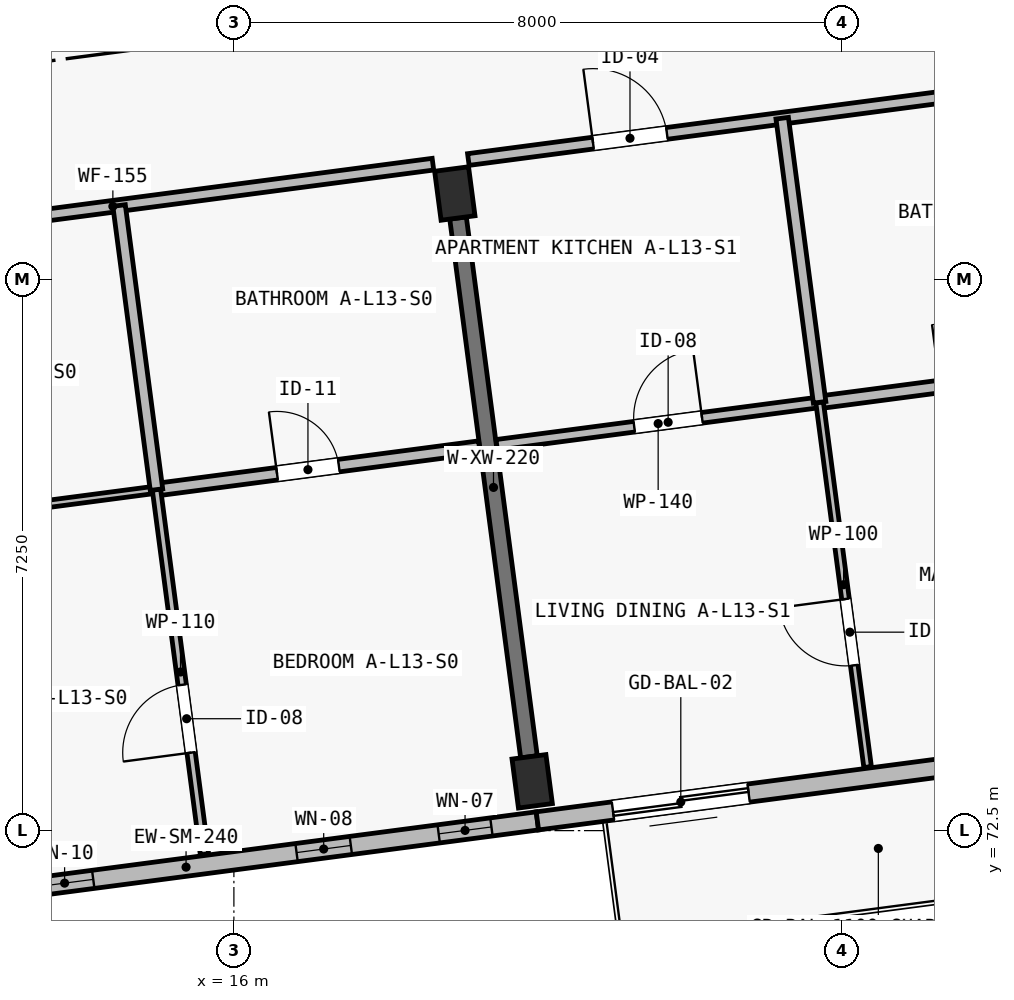
"""IFC4 building model, lengths in metres.
Left out: names, types, materials, properties, quantities, classifications, styles, units other than length and angle.
Written with IfcOpenShell. Run it as: python <this file> out.ifc"""

import sys

from ifc_helpers import new_model, si_unit, direction, frame, frame_2d, origin, origin_2d, place, context, subcontext, project, spatial, polyline, rectangle, outline, extrude, element, fill, save


model = new_model("IFC4")
c1 = context("Model", 3, precision=1e-05, world=origin(), true_north=direction((0.0, 1.0)))
c2 = subcontext(c1, "Body", "Model", "MODEL_VIEW")
j1 = project(units=[si_unit("LENGTHUNIT", "METRE"), si_unit("PLANEANGLEUNIT", "RADIAN")], contexts=[c1])
p1 = place(None, origin())
s1 = spatial("IfcSite", under=j1, at=p1, CompositionType="ELEMENT")
p2 = place(p1, origin())
s2 = spatial("IfcBuilding", under=s1, at=p2, CompositionType="ELEMENT")
p3 = place(p2, frame((0.0, 0.0, 44.15)))
s3 = spatial("IfcBuildingStorey", under=s2, at=p3, CompositionType="ELEMENT", Elevation=44.15)
for number, where, z_axis, x_axis in (
    (1, (19.925, 73.149, 0.0), (0.0, 0.0, 1.0), (0.991, 0.131, 0.0)),
    (2, (18.906, 80.882, 0.0), (0.0, 0.0, 1.0), (0.991, 0.131, 0.0)),
):
    element("IfcColumn", number, at=place(p3, frame(where, z_axis=z_axis, x_axis=x_axis)), inside=s3, PredefinedType="COLUMN", context=c2, shape_type="SweptSolid", body=[
        extrude(rectangle(XDim=0.45, YDim=0.65, at=origin_2d()), origin(), (0.0, 0.0, 1.0), 3.5),
    ])
p4 = place(p3, frame((19.882, 73.471, 0.0), z_axis=(0.0, 0.0, 1.0), x_axis=(-0.130541958643, 0.991442785557, 0.0)))
e3 = element("IfcWall", 3, at=p4, inside=s3, PredefinedType="SHEAR", context=c2, shape_type="SweptSolid", body=[
    extrude(rectangle(XDim=7.15, YDim=0.22, at=frame_2d((3.575, 0.0))), origin(), (0.0, 0.0, 1.0), 2.75),
])
p5 = place(p3, frame((19.993, 72.628, 0.0), z_axis=(0.0, 0.0, 1.0), x_axis=(-0.991442885224, -0.130541201693, 0.0)))
e4 = element("IfcWall", 4, at=p5, inside=s3, PredefinedType="SOLIDWALL", context=c2, shape_type="SweptSolid", body=[
    extrude(outline(polyline([(0.0, 0.0), (9.325, 0.0), (9.325, 7.697), (0.0, 6.119), (0.0, 0.0)])), frame((0.0, 0.12, 0.0), z_axis=(0.0, -1.0, 0.0), x_axis=(1.0, 0.0, 0.0)), (0.0, 0.0, 1.0), 0.24),
])
p6 = place(p5, frame((0.61, 0.0, 0.48)))
e5 = element("IfcOpeningElement", 5, at=p6, cuts=e4, PredefinedType="OPENING", context=c2, shape_type="SweptSolid", body=[
    extrude(rectangle(XDim=0.7, YDim=2.36, at=frame_2d((0.35, 1.18))), frame((0.0, 0.135, 0.0), z_axis=(0.0, -1.0, 0.0), x_axis=(1.0, 0.0, 0.0)), (0.0, 0.0, 1.0), 0.27),
])
p7 = place(p5, frame((2.476, 0.0, 0.52)))
e6 = element("IfcOpeningElement", 6, at=p7, cuts=e4, PredefinedType="OPENING", context=c2, shape_type="SweptSolid", body=[
    extrude(rectangle(XDim=0.72, YDim=2.16, at=frame_2d((0.36, 1.08))), frame((0.0, 0.135, 0.0), z_axis=(0.0, -1.0, 0.0), x_axis=(1.0, 0.0, 0.0)), (0.0, 0.0, 1.0), 0.27),
])
p8 = place(p5, frame((5.894, 0.0, 0.48)))
e7 = element("IfcOpeningElement", 7, at=p8, cuts=e4, PredefinedType="OPENING", context=c2, shape_type="SweptSolid", body=[
    extrude(rectangle(XDim=0.76, YDim=2.34, at=frame_2d((0.38, 1.17))), frame((0.0, 0.135, 0.0), z_axis=(0.0, -1.0, 0.0), x_axis=(1.0, 0.0, 0.0)), (0.0, 0.0, 1.0), 0.27),
])
p9 = place(p3, frame((28.718, 73.777, 0.0), z_axis=(0.0, 0.0, 1.0), x_axis=(-0.991444377792, -0.130529865336, 0.0)))
e8 = element("IfcWall", 8, at=p9, inside=s3, PredefinedType="SOLIDWALL", context=c2, shape_type="SweptSolid", body=[
    extrude(outline(polyline([(0.0, 0.0), (8.8, 0.0), (8.8, 6.119), (0.0, 4.629), (0.0, 0.0)])), frame((0.0, 0.12, 0.0), z_axis=(0.0, -1.0, 0.0), x_axis=(1.0, 0.0, 0.0)), (0.0, 0.0, 1.0), 0.24),
])
p10 = place(p9, frame((5.997, 0.0, 0.0)))
e9 = element("IfcOpeningElement", 9, at=p10, cuts=e8, PredefinedType="OPENING", context=c2, shape_type="SweptSolid", body=[
    extrude(rectangle(XDim=1.8, YDim=2.12, at=frame_2d((0.9, 1.06))), frame((0.0, 0.135, 0.0), z_axis=(0.0, -1.0, 0.0), x_axis=(1.0, 0.0, 0.0)), (0.0, 0.0, 1.0), 0.27),
])
p11 = place(p9, frame((0.83, 0.0, 0.5)))
e10 = element("IfcOpeningElement", 10, at=p11, cuts=e8, PredefinedType="OPENING", context=c2, shape_type="SweptSolid", body=[
    extrude(rectangle(XDim=0.84, YDim=2.28, at=frame_2d((0.42, 1.14))), frame((0.0, 0.135, 0.0), z_axis=(0.0, -1.0, 0.0), x_axis=(1.0, 0.0, 0.0)), (0.0, 0.0, 1.0), 0.27),
])
p12 = place(p3, frame((10.197, 80.159, 0.0), z_axis=(0.0, 0.0, 1.0), x_axis=(0.991447642549, 0.130505065361, 0.0)))
e11 = element("IfcWall", 11, at=p12, inside=s3, PredefinedType="PARTITIONING", context=c2, shape_type="SweptSolid", body=[
    extrude(rectangle(XDim=8.495, YDim=0.155, at=frame_2d((4.248, 0.0))), origin(), (0.0, 0.0, 1.0), 3.15),
])
p13 = place(p12, frame((1.82, 0.0, 0.0)))
e12 = element("IfcOpeningElement", 12, at=p13, cuts=e11, PredefinedType="OPENING", context=c2, shape_type="SweptSolid", body=[
    extrude(rectangle(XDim=1.02, YDim=2.2, at=frame_2d((0.51, 1.1))), frame((0.0, 0.093, 0.0), z_axis=(0.0, -1.0, 0.0), x_axis=(1.0, 0.0, 0.0)), (0.0, 0.0, 1.0), 0.185),
])
p14 = place(p3, frame((10.708, 76.424, 0.0), z_axis=(0.0, 0.0, 1.0), x_axis=(0.991438863922, 0.130571739306, 0.0)))
e13 = element("IfcWall", 13, at=p14, inside=s3, PredefinedType="PARTITIONING", context=c2, shape_type="SweptSolid", body=[
    extrude(rectangle(XDim=4.31, YDim=0.095, at=frame_2d((2.155, 0.0))), origin(), (0.0, 0.0, 1.0), 3.15),
])
p15 = place(p14, frame((1.85, 0.0, 0.0)))
e14 = element("IfcOpeningElement", 14, at=p15, cuts=e13, PredefinedType="OPENING", context=c2, shape_type="SweptSolid", body=[
    extrude(rectangle(XDim=0.9, YDim=2.1, at=frame_2d((0.45, 1.05))), frame((0.0, 0.062, 0.0), z_axis=(0.0, -1.0, 0.0), x_axis=(1.0, 0.0, 0.0)), (0.0, 0.0, 1.0), 0.125),
])
p16 = place(p3, frame((14.981, 76.986, 0.0), z_axis=(0.0, 0.0, 1.0), x_axis=(0.991444014242, 0.130532626667, 0.0)))
e15 = element("IfcWall", 15, at=p16, inside=s3, PredefinedType="PLUMBINGWALL", context=c2, shape_type="SweptSolid", body=[
    extrude(rectangle(XDim=4.285, YDim=0.165, at=frame_2d((2.143, 0.0))), origin(), (0.0, 0.0, 1.0), 3.15),
])
p17 = place(p16, frame((1.6, 0.0, 0.0)))
e16 = element("IfcOpeningElement", 16, at=p17, cuts=e15, PredefinedType="OPENING", context=c2, shape_type="SweptSolid", body=[
    extrude(rectangle(XDim=0.82, YDim=2.08, at=frame_2d((0.41, 1.04))), frame((0.0, 0.097, 0.0), z_axis=(0.0, -1.0, 0.0), x_axis=(1.0, 0.0, 0.0)), (0.0, 0.0, 1.0), 0.195),
])
p18 = place(p3, frame((15.613, 72.188, 0.0), z_axis=(0.0, 0.0, 1.0), x_axis=(-0.130544545786, 0.991442444908, 0.0)))
e17 = element("IfcWall", 17, at=p18, inside=s3, PredefinedType="PARTITIONING", context=c2, shape_type="SweptSolid", body=[
    extrude(rectangle(XDim=4.84, YDim=0.11, at=frame_2d((2.42, 0.0))), origin(), (0.0, 0.0, 1.0), 3.15),
])
p19 = place(p18, frame((1.35, 0.0, 0.0)))
e18 = element("IfcOpeningElement", 18, at=p19, cuts=e17, PredefinedType="OPENING", context=c2, shape_type="SweptSolid", body=[
    extrude(rectangle(XDim=0.9, YDim=2.1, at=frame_2d((0.45, 1.05))), frame((0.0, 0.07, 0.0), z_axis=(0.0, -1.0, 0.0), x_axis=(1.0, 0.0, 0.0)), (0.0, 0.0, 1.0), 0.14),
])
p20 = place(p3, frame((14.981, 76.986, 0.0), z_axis=(0.0, 0.0, 1.0), x_axis=(-0.130496394248, 0.991448783896, 0.0)))
e19 = element("IfcWall", 19, at=p20, inside=s3, PredefinedType="PLUMBINGWALL", context=c2, shape_type="SweptSolid", body=[
    extrude(rectangle(XDim=3.77, YDim=0.165, at=frame_2d((1.885, 0.0))), origin(), (0.0, 0.0, 1.0), 3.15),
])
p21 = place(p3, frame((19.085, 81.329, 0.0), z_axis=(0.0, 0.0, 1.0), x_axis=(0.991446911972, 0.130510615437, 0.0)))
e20 = element("IfcWall", 20, at=p21, inside=s3, PredefinedType="PARTITIONING", context=c2, shape_type="SweptSolid", body=[
    extrude(rectangle(XDim=8.33, YDim=0.155, at=frame_2d((4.165, 0.0))), origin(), (0.0, 0.0, 1.0), 3.15),
])
p22 = place(p21, frame((1.655, 0.0, 0.0)))
e21 = element("IfcOpeningElement", 21, at=p22, cuts=e20, PredefinedType="OPENING", context=c2, shape_type="SweptSolid", body=[
    extrude(rectangle(XDim=0.98, YDim=2.15, at=frame_2d((0.49, 1.075))), frame((0.0, 0.093, 0.0), z_axis=(0.0, -1.0, 0.0), x_axis=(1.0, 0.0, 0.0)), (0.0, 0.0, 1.0), 0.185),
])
p23 = place(p3, frame((19.458, 77.576, 0.0), z_axis=(0.0, 0.0, 1.0), x_axis=(0.991451386343, 0.130476620581, 0.0)))
e22 = element("IfcWall", 22, at=p23, inside=s3, PredefinedType="PARTITIONING", context=c2, shape_type="SweptSolid", body=[
    extrude(rectangle(XDim=4.285, YDim=0.14, at=frame_2d((2.143, 0.0))), origin(), (0.0, 0.0, 1.0), 3.15),
])
p24 = place(p23, frame((1.825, 0.0, 0.0)))
e23 = element("IfcOpeningElement", 23, at=p24, cuts=e22, PredefinedType="OPENING", context=c2, shape_type="SweptSolid", body=[
    extrude(rectangle(XDim=0.9, YDim=2.1, at=frame_2d((0.45, 1.05))), frame((0.0, 0.085, 0.0), z_axis=(0.0, -1.0, 0.0), x_axis=(1.0, 0.0, 0.0)), (0.0, 0.0, 1.0), 0.17),
])
p25 = place(p3, frame((23.706, 78.135, 0.0), z_axis=(0.0, 0.0, 1.0), x_axis=(0.991444014242, 0.130532626667, 0.0)))
e24 = element("IfcWall", 24, at=p25, inside=s3, PredefinedType="PLUMBINGWALL", context=c2, shape_type="SweptSolid", body=[
    extrude(rectangle(XDim=4.285, YDim=0.165, at=frame_2d((2.143, 0.0))), origin(), (0.0, 0.0, 1.0), 3.15),
])
p26 = place(p25, frame((1.6, 0.0, 0.0)))
e25 = element("IfcOpeningElement", 25, at=p26, cuts=e24, PredefinedType="OPENING", context=c2, shape_type="SweptSolid", body=[
    extrude(rectangle(XDim=0.82, YDim=2.08, at=frame_2d((0.41, 1.04))), frame((0.0, 0.097, 0.0), z_axis=(0.0, -1.0, 0.0), x_axis=(1.0, 0.0, 0.0)), (0.0, 0.0, 1.0), 0.195),
])
p27 = place(p3, frame((24.338, 73.336, 0.0), z_axis=(0.0, 0.0, 1.0), x_axis=(-0.130494962676, 0.991448972321, 0.0)))
e26 = element("IfcWall", 26, at=p27, inside=s3, PredefinedType="PARTITIONING", context=c2, shape_type="SweptSolid", body=[
    extrude(rectangle(XDim=4.84, YDim=0.1, at=frame_2d((2.42, 0.0))), origin(), (0.0, 0.0, 1.0), 3.15),
])
p28 = place(p27, frame((1.35, 0.0, 0.0)))
e27 = element("IfcOpeningElement", 27, at=p28, cuts=e26, PredefinedType="OPENING", context=c2, shape_type="SweptSolid", body=[
    extrude(rectangle(XDim=0.88, YDim=2.1, at=frame_2d((0.44, 1.05))), frame((0.0, 0.065, 0.0), z_axis=(0.0, -1.0, 0.0), x_axis=(1.0, 0.0, 0.0)), (0.0, 0.0, 1.0), 0.13),
])
p29 = place(p3, frame((23.706, 78.135, 0.0), z_axis=(0.0, 0.0, 1.0), x_axis=(-0.130551670646, 0.991441506742, 0.0)))
e28 = element("IfcWall", 28, at=p29, inside=s3, PredefinedType="PLUMBINGWALL", context=c2, shape_type="SweptSolid", body=[
    extrude(rectangle(XDim=3.77, YDim=0.165, at=frame_2d((1.885, 0.0))), origin(), (0.0, 0.0, 1.0), 3.15),
])
p30 = place(p6, origin())
e29 = element("IfcWindow", 29, at=p30, inside=s3, PartitioningType="SINGLE_PANEL", PredefinedType="WINDOW", context=c2, shape_type="SweptSolid", body=[
    extrude(rectangle(XDim=0.7, YDim=2.36, at=frame_2d((0.35, 1.18))), frame((0.0, 0.03, 0.0), z_axis=(0.0, -1.0, 0.0), x_axis=(1.0, 0.0, 0.0)), (0.0, 0.0, 1.0), 0.06),
])
fill(e5, e29)
p31 = place(p7, origin())
e30 = element("IfcWindow", 30, at=p31, inside=s3, PartitioningType="SINGLE_PANEL", PredefinedType="WINDOW", context=c2, shape_type="SweptSolid", body=[
    extrude(rectangle(XDim=0.72, YDim=2.16, at=frame_2d((0.36, 1.08))), frame((0.0, 0.03, 0.0), z_axis=(0.0, -1.0, 0.0), x_axis=(1.0, 0.0, 0.0)), (0.0, 0.0, 1.0), 0.06),
])
fill(e6, e30)
p32 = place(p8, origin())
e31 = element("IfcWindow", 31, at=p32, inside=s3, PartitioningType="SINGLE_PANEL", PredefinedType="WINDOW", context=c2, shape_type="SweptSolid", body=[
    extrude(rectangle(XDim=0.76, YDim=2.34, at=frame_2d((0.38, 1.17))), frame((0.0, 0.03, 0.0), z_axis=(0.0, -1.0, 0.0), x_axis=(1.0, 0.0, 0.0)), (0.0, 0.0, 1.0), 0.06),
])
fill(e7, e31)
p33 = place(p10, origin())
e32 = element("IfcDoor", 32, at=p33, inside=s3, OperationType="SLIDING_TO_LEFT", PredefinedType="DOOR", context=c2, shape_type="SweptSolid", body=[
    extrude(rectangle(XDim=1.8, YDim=2.12, at=frame_2d((0.9, 1.06))), frame((0.0, 0.025, 0.0), z_axis=(0.0, -1.0, 0.0), x_axis=(1.0, 0.0, 0.0)), (0.0, 0.0, 1.0), 0.05),
])
fill(e9, e32)
p34 = place(p17, origin())
e33 = element("IfcDoor", 33, at=p34, inside=s3, OperationType="SINGLE_SWING_LEFT", PredefinedType="DOOR", context=c2, shape_type="SweptSolid", body=[
    extrude(rectangle(XDim=0.82, YDim=2.08, at=frame_2d((0.41, 1.04))), frame((0.0, 0.025, 0.0), z_axis=(0.0, -1.0, 0.0), x_axis=(1.0, 0.0, 0.0)), (0.0, 0.0, 1.0), 0.05),
])
fill(e16, e33)
p35 = place(p19, origin())
e34 = element("IfcDoor", 34, at=p35, inside=s3, OperationType="SINGLE_SWING_LEFT", PredefinedType="DOOR", context=c2, shape_type="SweptSolid", body=[
    extrude(rectangle(XDim=0.9, YDim=2.1, at=frame_2d((0.45, 1.05))), frame((0.0, 0.025, 0.0), z_axis=(0.0, -1.0, 0.0), x_axis=(1.0, 0.0, 0.0)), (0.0, 0.0, 1.0), 0.05),
])
fill(e18, e34)
p36 = place(p22, origin())
e35 = element("IfcDoor", 35, at=p36, inside=s3, OperationType="SINGLE_SWING_LEFT", PredefinedType="DOOR", context=c2, shape_type="SweptSolid", body=[
    extrude(rectangle(XDim=0.98, YDim=2.15, at=frame_2d((0.49, 1.075))), frame((0.0, 0.025, 0.0), z_axis=(0.0, -1.0, 0.0), x_axis=(1.0, 0.0, 0.0)), (0.0, 0.0, 1.0), 0.05),
])
fill(e21, e35)
p37 = place(p24, origin())
e36 = element("IfcDoor", 36, at=p37, inside=s3, OperationType="SINGLE_SWING_RIGHT", PredefinedType="DOOR", context=c2, shape_type="SweptSolid", body=[
    extrude(rectangle(XDim=0.9, YDim=2.1, at=frame_2d((0.45, 1.05))), frame((0.0, 0.025, 0.0), z_axis=(0.0, -1.0, 0.0), x_axis=(1.0, 0.0, 0.0)), (0.0, 0.0, 1.0), 0.05),
])
fill(e23, e36)
p38 = place(p28, origin())
e37 = element("IfcDoor", 37, at=p38, inside=s3, OperationType="SINGLE_SWING_RIGHT", PredefinedType="DOOR", context=c2, shape_type="SweptSolid", body=[
    extrude(rectangle(XDim=0.88, YDim=2.1, at=frame_2d((0.44, 1.05))), frame((0.0, 0.025, 0.0), z_axis=(0.0, -1.0, 0.0), x_axis=(1.0, 0.0, 0.0)), (0.0, 0.0, 1.0), 0.05),
])
fill(e27, e37)
save(model, sys.argv[1])
